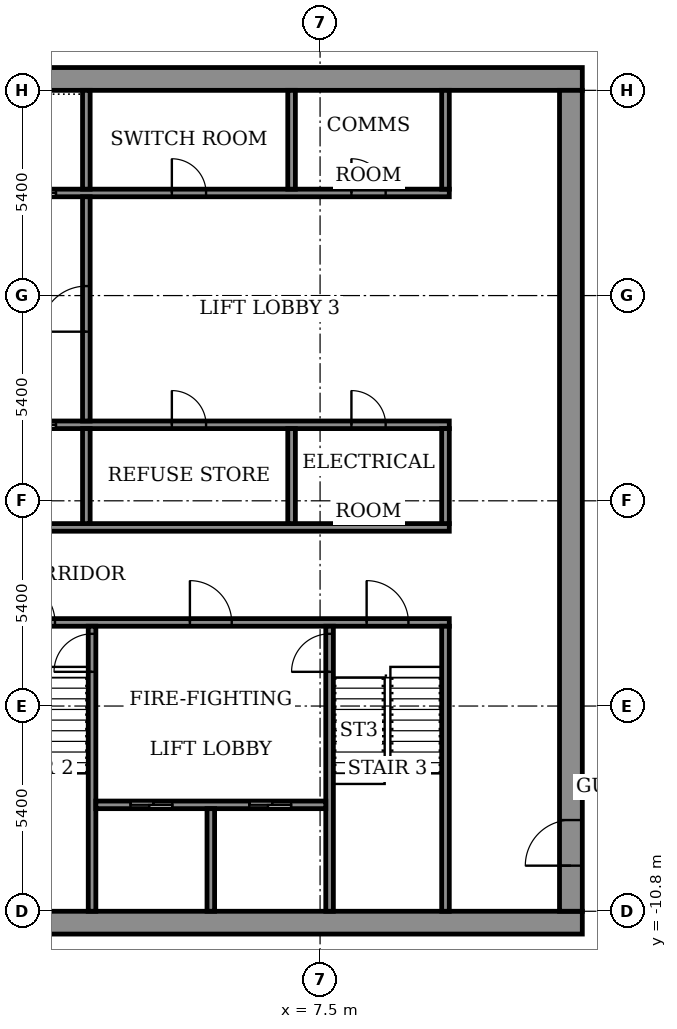
"""IFC4 building model, lengths in metres.
Left out: names, types, materials, properties, quantities, classifications, styles, units other than length and angle.
Written with IfcOpenShell. Run it as: python <this file> out.ifc"""

import sys

from ifc_helpers import new_model, si_unit, direction, frame, frame_2d, origin, place, context, subcontext, project, spatial, rectangle, extrude, element, fill, save


model = new_model("IFC4")
c1 = context("Model", 3, precision=1e-05, world=origin(), true_north=direction((0.0, 1.0)))
c2 = subcontext(c1, "Body", "Model", "MODEL_VIEW")
j1 = project(units=[si_unit("LENGTHUNIT", "METRE"), si_unit("PLANEANGLEUNIT", "RADIAN")], contexts=[c1])
p1 = place(None, origin())
s1 = spatial("IfcSite", under=j1, at=p1, CompositionType="ELEMENT")
p2 = place(p1, origin())
s2 = spatial("IfcBuilding", under=s1, at=p2, CompositionType="ELEMENT")
p3 = place(p2, frame((0.0, 0.0, 306.1)))
s3 = spatial("IfcBuildingStorey", under=s2, at=p3, CompositionType="ELEMENT", Elevation=306.1)
for number, where, z_axis, x_axis in (
    (1, (-14.4, -11.1, 0.0), (0.0, 0.0, 1.0), (1.0, 0.0, 0.0)),
    (2, (-14.4, 11.1, 0.0), (0.0, 0.0, 1.0), (1.0, 0.0, 0.0)),
):
    element("IfcWall", number, at=place(p3, frame(where, z_axis=z_axis, x_axis=x_axis)), inside=s3, PredefinedType="SHEAR", context=c2, shape_type="SweptSolid", body=[
        extrude(rectangle(XDim=28.8, YDim=0.6, at=frame_2d((14.4, 0.0))), origin(), (0.0, 0.0, 1.0), 3.6),
    ])
p4 = place(p3, frame((14.1, -10.8, 0.0), z_axis=(0.0, 0.0, 1.0), x_axis=(0.0, 1.0, 0.0)))
e3 = element("IfcWall", 3, at=p4, inside=s3, PredefinedType="SHEAR", context=c2, shape_type="SweptSolid", body=[
    extrude(rectangle(XDim=21.6, YDim=0.6, at=frame_2d((10.8, 0.0))), origin(), (0.0, 0.0, 1.0), 3.6),
])
p5 = place(p4, frame((1.2, 0.0, 0.0)))
e4 = element("IfcOpeningElement", 4, at=p5, cuts=e3, PredefinedType="OPENING", context=c2, shape_type="SweptSolid", body=[
    extrude(rectangle(XDim=1.2, YDim=2.1, at=frame_2d((0.6, 1.05))), frame((0.0, 0.31, 0.0), z_axis=(0.0, -1.0, 0.0), x_axis=(1.0, 0.0, 0.0)), (0.0, 0.0, 1.0), 0.62),
])
p6 = place(p3, frame((-10.9, -3.2, 0.0), z_axis=(0.0, 0.0, 1.0), x_axis=(1.0, 0.0, 0.0)))
e5 = element("IfcWall", 5, at=p6, inside=s3, PredefinedType="SHEAR", context=c2, shape_type="SweptSolid", body=[
    extrude(rectangle(XDim=21.8, YDim=0.2, at=frame_2d((10.9, 0.0))), origin(), (0.0, 0.0, 1.0), 3.05),
])
p7 = place(p6, frame((1.075, 0.0, 0.0)))
e6 = element("IfcOpeningElement", 6, at=p7, cuts=e5, PredefinedType="OPENING", context=c2, shape_type="SweptSolid", body=[
    extrude(rectangle(XDim=1.1, YDim=2.1, at=frame_2d((0.55, 1.05))), frame((0.0, 0.11, 0.0), z_axis=(0.0, -1.0, 0.0), x_axis=(1.0, 0.0, 0.0)), (0.0, 0.0, 1.0), 0.22),
])
p8 = place(p6, frame((10.325, 0.0, 0.0)))
e7 = element("IfcOpeningElement", 7, at=p8, cuts=e5, PredefinedType="OPENING", context=c2, shape_type="SweptSolid", body=[
    extrude(rectangle(XDim=1.1, YDim=2.1, at=frame_2d((0.55, 1.05))), frame((0.0, 0.11, 0.0), z_axis=(0.0, -1.0, 0.0), x_axis=(1.0, 0.0, 0.0)), (0.0, 0.0, 1.0), 0.22),
])
p9 = place(p6, frame((19.625, 0.0, 0.0)))
e8 = element("IfcOpeningElement", 8, at=p9, cuts=e5, PredefinedType="OPENING", context=c2, shape_type="SweptSolid", body=[
    extrude(rectangle(XDim=1.1, YDim=2.1, at=frame_2d((0.55, 1.05))), frame((0.0, 0.11, 0.0), z_axis=(0.0, -1.0, 0.0), x_axis=(1.0, 0.0, 0.0)), (0.0, 0.0, 1.0), 0.22),
])
p10 = place(p6, frame((5.7, 0.0, 0.0)))
e9 = element("IfcOpeningElement", 9, at=p10, cuts=e5, PredefinedType="OPENING", context=c2, shape_type="SweptSolid", body=[
    extrude(rectangle(XDim=1.1, YDim=2.1, at=frame_2d((0.55, 1.05))), frame((0.0, 0.11, 0.0), z_axis=(0.0, -1.0, 0.0), x_axis=(1.0, 0.0, 0.0)), (0.0, 0.0, 1.0), 0.22),
])
p11 = place(p6, frame((14.975, 0.0, 0.0)))
e10 = element("IfcOpeningElement", 10, at=p11, cuts=e5, PredefinedType="OPENING", context=c2, shape_type="SweptSolid", body=[
    extrude(rectangle(XDim=1.1, YDim=2.1, at=frame_2d((0.55, 1.05))), frame((0.0, 0.11, 0.0), z_axis=(0.0, -1.0, 0.0), x_axis=(1.0, 0.0, 0.0)), (0.0, 0.0, 1.0), 0.22),
])
p12 = place(p3, frame((-10.9, -0.7, 0.0), z_axis=(0.0, 0.0, 1.0), x_axis=(1.0, 0.0, 0.0)))
e11 = element("IfcWall", 11, at=p12, inside=s3, PredefinedType="SHEAR", context=c2, shape_type="SweptSolid", body=[
    extrude(rectangle(XDim=21.8, YDim=0.2, at=frame_2d((10.9, 0.0))), origin(), (0.0, 0.0, 1.0), 3.05),
])
p13 = place(p3, frame((-10.9, 2.0, 0.0), z_axis=(0.0, 0.0, 1.0), x_axis=(1.0, 0.0, 0.0)))
e12 = element("IfcWall", 12, at=p13, inside=s3, PredefinedType="SHEAR", context=c2, shape_type="SweptSolid", body=[
    extrude(rectangle(XDim=21.8, YDim=0.2, at=frame_2d((10.9, 0.0))), origin(), (0.0, 0.0, 1.0), 3.05),
])
p14 = place(p13, frame((4.95, 0.0, 0.0)))
e13 = element("IfcOpeningElement", 13, at=p14, cuts=e12, PredefinedType="OPENING", context=c2, shape_type="SweptSolid", body=[
    extrude(rectangle(XDim=1.1, YDim=2.1, at=frame_2d((0.55, 1.05))), frame((0.0, 0.11, 0.0), z_axis=(0.0, -1.0, 0.0), x_axis=(1.0, 0.0, 0.0)), (0.0, 0.0, 1.0), 0.22),
])
p15 = place(p13, frame((7.65, 0.0, 0.0)))
e14 = element("IfcOpeningElement", 14, at=p15, cuts=e12, PredefinedType="OPENING", context=c2, shape_type="SweptSolid", body=[
    extrude(rectangle(XDim=1.1, YDim=2.1, at=frame_2d((0.55, 1.05))), frame((0.0, 0.11, 0.0), z_axis=(0.0, -1.0, 0.0), x_axis=(1.0, 0.0, 0.0)), (0.0, 0.0, 1.0), 0.22),
])
p16 = place(p13, frame((10.35, 0.0, 0.0)))
e15 = element("IfcOpeningElement", 15, at=p16, cuts=e12, PredefinedType="OPENING", context=c2, shape_type="SweptSolid", body=[
    extrude(rectangle(XDim=1.1, YDim=2.1, at=frame_2d((0.55, 1.05))), frame((0.0, 0.11, 0.0), z_axis=(0.0, -1.0, 0.0), x_axis=(1.0, 0.0, 0.0)), (0.0, 0.0, 1.0), 0.22),
])
p17 = place(p13, frame((1.675, 0.0, 0.0)))
e16 = element("IfcOpeningElement", 16, at=p17, cuts=e12, PredefinedType="OPENING", context=c2, shape_type="SweptSolid", body=[
    extrude(rectangle(XDim=0.9, YDim=2.1, at=frame_2d((0.45, 1.05))), frame((0.0, 0.11, 0.0), z_axis=(0.0, -1.0, 0.0), x_axis=(1.0, 0.0, 0.0)), (0.0, 0.0, 1.0), 0.22),
])
p18 = place(p13, frame((14.5, 0.0, 0.0)))
e17 = element("IfcOpeningElement", 17, at=p18, cuts=e12, PredefinedType="OPENING", context=c2, shape_type="SweptSolid", body=[
    extrude(rectangle(XDim=0.9, YDim=2.1, at=frame_2d((0.45, 1.05))), frame((0.0, 0.11, 0.0), z_axis=(0.0, -1.0, 0.0), x_axis=(1.0, 0.0, 0.0)), (0.0, 0.0, 1.0), 0.22),
])
p19 = place(p13, frame((19.225, 0.0, 0.0)))
e18 = element("IfcOpeningElement", 18, at=p19, cuts=e12, PredefinedType="OPENING", context=c2, shape_type="SweptSolid", body=[
    extrude(rectangle(XDim=0.9, YDim=2.1, at=frame_2d((0.45, 1.05))), frame((0.0, 0.11, 0.0), z_axis=(0.0, -1.0, 0.0), x_axis=(1.0, 0.0, 0.0)), (0.0, 0.0, 1.0), 0.22),
])
p20 = place(p3, frame((-10.9, 8.1, 0.0), z_axis=(0.0, 0.0, 1.0), x_axis=(1.0, 0.0, 0.0)))
e19 = element("IfcWall", 19, at=p20, inside=s3, PredefinedType="SHEAR", context=c2, shape_type="SweptSolid", body=[
    extrude(rectangle(XDim=21.8, YDim=0.2, at=frame_2d((10.9, 0.0))), origin(), (0.0, 0.0, 1.0), 3.05),
])
p21 = place(p20, frame((4.95, 0.0, 0.0)))
e20 = element("IfcOpeningElement", 20, at=p21, cuts=e19, PredefinedType="OPENING", context=c2, shape_type="SweptSolid", body=[
    extrude(rectangle(XDim=1.1, YDim=2.1, at=frame_2d((0.55, 1.05))), frame((0.0, 0.11, 0.0), z_axis=(0.0, -1.0, 0.0), x_axis=(1.0, 0.0, 0.0)), (0.0, 0.0, 1.0), 0.22),
])
p22 = place(p20, frame((7.65, 0.0, 0.0)))
e21 = element("IfcOpeningElement", 21, at=p22, cuts=e19, PredefinedType="OPENING", context=c2, shape_type="SweptSolid", body=[
    extrude(rectangle(XDim=1.1, YDim=2.1, at=frame_2d((0.55, 1.05))), frame((0.0, 0.11, 0.0), z_axis=(0.0, -1.0, 0.0), x_axis=(1.0, 0.0, 0.0)), (0.0, 0.0, 1.0), 0.22),
])
p23 = place(p20, frame((10.35, 0.0, 0.0)))
e22 = element("IfcOpeningElement", 22, at=p23, cuts=e19, PredefinedType="OPENING", context=c2, shape_type="SweptSolid", body=[
    extrude(rectangle(XDim=1.1, YDim=2.1, at=frame_2d((0.55, 1.05))), frame((0.0, 0.11, 0.0), z_axis=(0.0, -1.0, 0.0), x_axis=(1.0, 0.0, 0.0)), (0.0, 0.0, 1.0), 0.22),
])
p24 = place(p20, frame((1.675, 0.0, 0.0)))
e23 = element("IfcOpeningElement", 23, at=p24, cuts=e19, PredefinedType="OPENING", context=c2, shape_type="SweptSolid", body=[
    extrude(rectangle(XDim=0.9, YDim=2.1, at=frame_2d((0.45, 1.05))), frame((0.0, 0.11, 0.0), z_axis=(0.0, -1.0, 0.0), x_axis=(1.0, 0.0, 0.0)), (0.0, 0.0, 1.0), 0.22),
])
p25 = place(p20, frame((14.5, 0.0, 0.0)))
e24 = element("IfcOpeningElement", 24, at=p25, cuts=e19, PredefinedType="OPENING", context=c2, shape_type="SweptSolid", body=[
    extrude(rectangle(XDim=0.9, YDim=2.1, at=frame_2d((0.45, 1.05))), frame((0.0, 0.11, 0.0), z_axis=(0.0, -1.0, 0.0), x_axis=(1.0, 0.0, 0.0)), (0.0, 0.0, 1.0), 0.22),
])
p26 = place(p20, frame((19.225, 0.0, 0.0)))
e25 = element("IfcOpeningElement", 25, at=p26, cuts=e19, PredefinedType="OPENING", context=c2, shape_type="SweptSolid", body=[
    extrude(rectangle(XDim=0.9, YDim=2.1, at=frame_2d((0.45, 1.05))), frame((0.0, 0.11, 0.0), z_axis=(0.0, -1.0, 0.0), x_axis=(1.0, 0.0, 0.0)), (0.0, 0.0, 1.0), 0.22),
])
p27 = place(p3, frame((1.5, -10.8, 0.0), z_axis=(0.0, 0.0, 1.0), x_axis=(0.0, 1.0, 0.0)))
e26 = element("IfcWall", 26, at=p27, inside=s3, PredefinedType="SHEAR", context=c2, shape_type="SweptSolid", body=[
    extrude(rectangle(XDim=7.5, YDim=0.2, at=frame_2d((3.75, 0.0))), origin(), (0.0, 0.0, 1.0), 3.05),
])
p28 = place(p27, frame((6.3, 0.0, 0.0)))
e27 = element("IfcOpeningElement", 27, at=p28, cuts=e26, PredefinedType="OPENING", context=c2, shape_type="SweptSolid", body=[
    extrude(rectangle(XDim=1.0, YDim=2.1, at=frame_2d((0.5, 1.05))), frame((0.0, 0.11, 0.0), z_axis=(0.0, -1.0, 0.0), x_axis=(1.0, 0.0, 0.0)), (0.0, 0.0, 1.0), 0.22),
])
p29 = place(p3, frame((7.75, -10.8, 0.0), z_axis=(0.0, 0.0, 1.0), x_axis=(0.0, 1.0, 0.0)))
e28 = element("IfcWall", 28, at=p29, inside=s3, PredefinedType="SHEAR", context=c2, shape_type="SweptSolid", body=[
    extrude(rectangle(XDim=7.5, YDim=0.2, at=frame_2d((3.75, 0.0))), origin(), (0.0, 0.0, 1.0), 3.05),
])
p30 = place(p29, frame((6.3, 0.0, 0.0)))
e29 = element("IfcOpeningElement", 29, at=p30, cuts=e28, PredefinedType="OPENING", context=c2, shape_type="SweptSolid", body=[
    extrude(rectangle(XDim=1.0, YDim=2.1, at=frame_2d((0.5, 1.05))), frame((0.0, 0.11, 0.0), z_axis=(0.0, -1.0, 0.0), x_axis=(1.0, 0.0, 0.0)), (0.0, 0.0, 1.0), 0.22),
])
p31 = place(p3, frame((10.8, -10.8, 0.0), z_axis=(0.0, 0.0, 1.0), x_axis=(0.0, 1.0, 0.0)))
e30 = element("IfcWall", 30, at=p31, inside=s3, PredefinedType="SHEAR", context=c2, shape_type="SweptSolid", body=[
    extrude(rectangle(XDim=7.5, YDim=0.2, at=frame_2d((3.75, 0.0))), origin(), (0.0, 0.0, 1.0), 3.05),
])
p32 = place(p3, frame((1.6, -8.0, 0.0), z_axis=(0.0, 0.0, 1.0), x_axis=(1.0, 0.0, 0.0)))
e31 = element("IfcWall", 31, at=p32, inside=s3, PredefinedType="SHEAR", context=c2, shape_type="SweptSolid", body=[
    extrude(rectangle(XDim=6.05, YDim=0.2, at=frame_2d((3.025, 0.0))), origin(), (0.0, 0.0, 1.0), 3.05),
])
p33 = place(p32, frame((0.913, 0.0, 0.0)))
e32 = element("IfcOpeningElement", 32, at=p33, cuts=e31, PredefinedType="OPENING", context=c2, shape_type="SweptSolid", body=[
    extrude(rectangle(XDim=1.1, YDim=2.1, at=frame_2d((0.55, 1.05))), frame((0.0, 0.11, 0.0), z_axis=(0.0, -1.0, 0.0), x_axis=(1.0, 0.0, 0.0)), (0.0, 0.0, 1.0), 0.22),
])
p34 = place(p32, frame((4.038, 0.0, 0.0)))
e33 = element("IfcOpeningElement", 33, at=p34, cuts=e31, PredefinedType="OPENING", context=c2, shape_type="SweptSolid", body=[
    extrude(rectangle(XDim=1.1, YDim=2.1, at=frame_2d((0.55, 1.05))), frame((0.0, 0.11, 0.0), z_axis=(0.0, -1.0, 0.0), x_axis=(1.0, 0.0, 0.0)), (0.0, 0.0, 1.0), 0.22),
])
p35 = place(p3, frame((4.625, -10.8, 0.0), z_axis=(0.0, 0.0, 1.0), x_axis=(0.0, 1.0, 0.0)))
e34 = element("IfcWall", 34, at=p35, inside=s3, PredefinedType="SHEAR", context=c2, shape_type="SweptSolid", body=[
    extrude(rectangle(XDim=2.7, YDim=0.2, at=frame_2d((1.35, 0.0))), origin(), (0.0, 0.0, 1.0), 3.05),
])
p36 = place(p3, frame((1.35, -0.6, 0.0), z_axis=(0.0, 0.0, 1.0), x_axis=(0.0, 1.0, 0.0)))
e35 = element("IfcWall", 35, at=p36, inside=s3, PredefinedType="SHEAR", context=c2, shape_type="SweptSolid", body=[
    extrude(rectangle(XDim=2.5, YDim=0.2, at=frame_2d((1.25, 0.0))), origin(), (0.0, 0.0, 1.0), 3.05),
])
for number, where, z_axis, x_axis in (
    (36, (6.75, -0.6, 0.0), (0.0, 0.0, 1.0), (0.0, 1.0, 0.0)),
    (37, (10.8, -0.6, 0.0), (0.0, 0.0, 1.0), (0.0, 1.0, 0.0)),
):
    element("IfcWall", number, at=place(p3, frame(where, z_axis=z_axis, x_axis=x_axis)), inside=s3, PredefinedType="STANDARD", context=c2, shape_type="SweptSolid", body=[
        extrude(rectangle(XDim=2.5, YDim=0.2, at=frame_2d((1.25, 0.0))), origin(), (0.0, 0.0, 1.0), 3.05),
    ])
p37 = place(p3, frame((1.35, 8.2, 0.0), z_axis=(0.0, 0.0, 1.0), x_axis=(0.0, 1.0, 0.0)))
e38 = element("IfcWall", 38, at=p37, inside=s3, PredefinedType="SHEAR", context=c2, shape_type="SweptSolid", body=[
    extrude(rectangle(XDim=2.6, YDim=0.2, at=frame_2d((1.3, 0.0))), origin(), (0.0, 0.0, 1.0), 3.05),
])
for number, where, z_axis, x_axis in (
    (39, (6.75, 8.2, 0.0), (0.0, 0.0, 1.0), (0.0, 1.0, 0.0)),
    (40, (10.8, 8.2, 0.0), (0.0, 0.0, 1.0), (0.0, 1.0, 0.0)),
):
    element("IfcWall", number, at=place(p3, frame(where, z_axis=z_axis, x_axis=x_axis)), inside=s3, PredefinedType="STANDARD", context=c2, shape_type="SweptSolid", body=[
        extrude(rectangle(XDim=2.6, YDim=0.2, at=frame_2d((1.3, 0.0))), origin(), (0.0, 0.0, 1.0), 3.05),
    ])
p38 = place(p3, frame((1.35, 2.1, 0.0), z_axis=(0.0, 0.0, 1.0), x_axis=(0.0, 1.0, 0.0)))
e41 = element("IfcWall", 41, at=p38, inside=s3, PredefinedType="STANDARD", context=c2, shape_type="SweptSolid", body=[
    extrude(rectangle(XDim=5.9, YDim=0.2, at=frame_2d((2.95, 0.0))), origin(), (0.0, 0.0, 1.0), 3.05),
])
p39 = place(p38, frame((2.35, 0.0, 0.0)))
e42 = element("IfcOpeningElement", 42, at=p39, cuts=e41, PredefinedType="OPENING", context=c2, shape_type="SweptSolid", body=[
    extrude(rectangle(XDim=1.2, YDim=2.1, at=frame_2d((0.6, 1.05))), frame((0.0, 0.11, 0.0), z_axis=(0.0, -1.0, 0.0), x_axis=(1.0, 0.0, 0.0)), (0.0, 0.0, 1.0), 0.22),
])
p40 = place(p5, origin())
e43 = element("IfcDoor", 43, at=p40, inside=s3, OperationType="DOUBLE_DOOR_SINGLE_SWING", PredefinedType="DOOR", context=c2, shape_type="SweptSolid", body=[
    extrude(rectangle(XDim=1.2, YDim=2.1, at=frame_2d((0.6, 1.05))), frame((0.0, 0.025, 0.0), z_axis=(0.0, -1.0, 0.0), x_axis=(1.0, 0.0, 0.0)), (0.0, 0.0, 1.0), 0.05),
])
fill(e4, e43)
p41 = place(p16, origin())
e44 = element("IfcDoor", 44, at=p41, inside=s3, OperationType="SLIDING_TO_LEFT", PredefinedType="DOOR", context=c2, shape_type="SweptSolid", body=[
    extrude(rectangle(XDim=1.1, YDim=2.1, at=frame_2d((0.55, 1.05))), frame((0.0, 0.025, 0.0), z_axis=(0.0, -1.0, 0.0), x_axis=(1.0, 0.0, 0.0)), (0.0, 0.0, 1.0), 0.05),
])
fill(e15, e44)
p42 = place(p23, origin())
e45 = element("IfcDoor", 45, at=p42, inside=s3, OperationType="SLIDING_TO_LEFT", PredefinedType="DOOR", context=c2, shape_type="SweptSolid", body=[
    extrude(rectangle(XDim=1.1, YDim=2.1, at=frame_2d((0.55, 1.05))), frame((0.0, 0.025, 0.0), z_axis=(0.0, -1.0, 0.0), x_axis=(1.0, 0.0, 0.0)), (0.0, 0.0, 1.0), 0.05),
])
fill(e22, e45)
p43 = place(p18, origin())
e46 = element("IfcDoor", 46, at=p43, inside=s3, OperationType="SINGLE_SWING_RIGHT", PredefinedType="DOOR", context=c2, shape_type="SweptSolid", body=[
    extrude(rectangle(XDim=0.9, YDim=2.1, at=frame_2d((0.45, 1.05))), frame((0.0, 0.025, 0.0), z_axis=(0.0, -1.0, 0.0), x_axis=(1.0, 0.0, 0.0)), (0.0, 0.0, 1.0), 0.05),
])
fill(e17, e46)
p44 = place(p19, origin())
e47 = element("IfcDoor", 47, at=p44, inside=s3, OperationType="SINGLE_SWING_LEFT", PredefinedType="DOOR", context=c2, shape_type="SweptSolid", body=[
    extrude(rectangle(XDim=0.9, YDim=2.1, at=frame_2d((0.45, 1.05))), frame((0.0, 0.025, 0.0), z_axis=(0.0, -1.0, 0.0), x_axis=(1.0, 0.0, 0.0)), (0.0, 0.0, 1.0), 0.05),
])
fill(e18, e47)
p45 = place(p25, origin())
e48 = element("IfcDoor", 48, at=p45, inside=s3, OperationType="SINGLE_SWING_LEFT", PredefinedType="DOOR", context=c2, shape_type="SweptSolid", body=[
    extrude(rectangle(XDim=0.9, YDim=2.1, at=frame_2d((0.45, 1.05))), frame((0.0, 0.025, 0.0), z_axis=(0.0, -1.0, 0.0), x_axis=(1.0, 0.0, 0.0)), (0.0, 0.0, 1.0), 0.05),
])
fill(e24, e48)
p46 = place(p26, origin())
e49 = element("IfcDoor", 49, at=p46, inside=s3, OperationType="SINGLE_SWING_LEFT", PredefinedType="DOOR", context=c2, shape_type="SweptSolid", body=[
    extrude(rectangle(XDim=0.9, YDim=2.1, at=frame_2d((0.45, 1.05))), frame((0.0, 0.025, 0.0), z_axis=(0.0, -1.0, 0.0), x_axis=(1.0, 0.0, 0.0)), (0.0, 0.0, 1.0), 0.05),
])
fill(e25, e49)
p47 = place(p33, origin())
e50 = element("IfcDoor", 50, at=p47, inside=s3, OperationType="SLIDING_TO_LEFT", PredefinedType="DOOR", context=c2, shape_type="SweptSolid", body=[
    extrude(rectangle(XDim=1.1, YDim=2.1, at=frame_2d((0.55, 1.05))), frame((0.0, 0.025, 0.0), z_axis=(0.0, -1.0, 0.0), x_axis=(1.0, 0.0, 0.0)), (0.0, 0.0, 1.0), 0.05),
])
fill(e32, e50)
p48 = place(p34, origin())
e51 = element("IfcDoor", 51, at=p48, inside=s3, OperationType="SLIDING_TO_LEFT", PredefinedType="DOOR", context=c2, shape_type="SweptSolid", body=[
    extrude(rectangle(XDim=1.1, YDim=2.1, at=frame_2d((0.55, 1.05))), frame((0.0, 0.025, 0.0), z_axis=(0.0, -1.0, 0.0), x_axis=(1.0, 0.0, 0.0)), (0.0, 0.0, 1.0), 0.05),
])
fill(e33, e51)
p49 = place(p8, origin())
e52 = element("IfcDoor", 52, at=p49, inside=s3, OperationType="SINGLE_SWING_RIGHT", PredefinedType="DOOR", context=c2, shape_type="SweptSolid", body=[
    extrude(rectangle(XDim=1.1, YDim=2.1, at=frame_2d((0.55, 1.05))), frame((0.0, 0.025, 0.0), z_axis=(0.0, -1.0, 0.0), x_axis=(1.0, 0.0, 0.0)), (0.0, 0.0, 1.0), 0.05),
])
fill(e7, e52)
p50 = place(p9, origin())
e53 = element("IfcDoor", 53, at=p50, inside=s3, OperationType="SINGLE_SWING_RIGHT", PredefinedType="DOOR", context=c2, shape_type="SweptSolid", body=[
    extrude(rectangle(XDim=1.1, YDim=2.1, at=frame_2d((0.55, 1.05))), frame((0.0, 0.025, 0.0), z_axis=(0.0, -1.0, 0.0), x_axis=(1.0, 0.0, 0.0)), (0.0, 0.0, 1.0), 0.05),
])
fill(e8, e53)
p51 = place(p11, origin())
e54 = element("IfcDoor", 54, at=p51, inside=s3, OperationType="SINGLE_SWING_LEFT", PredefinedType="DOOR", context=c2, shape_type="SweptSolid", body=[
    extrude(rectangle(XDim=1.1, YDim=2.1, at=frame_2d((0.55, 1.05))), frame((0.0, 0.025, 0.0), z_axis=(0.0, -1.0, 0.0), x_axis=(1.0, 0.0, 0.0)), (0.0, 0.0, 1.0), 0.05),
])
fill(e10, e54)
p52 = place(p28, origin())
e55 = element("IfcDoor", 55, at=p52, inside=s3, OperationType="SINGLE_SWING_RIGHT", PredefinedType="DOOR", context=c2, shape_type="SweptSolid", body=[
    extrude(rectangle(XDim=1.0, YDim=2.1, at=frame_2d((0.5, 1.05))), frame((0.0, 0.025, 0.0), z_axis=(0.0, -1.0, 0.0), x_axis=(1.0, 0.0, 0.0)), (0.0, 0.0, 1.0), 0.05),
])
fill(e27, e55)
p53 = place(p30, origin())
e56 = element("IfcDoor", 56, at=p53, inside=s3, OperationType="SINGLE_SWING_RIGHT", PredefinedType="DOOR", context=c2, shape_type="SweptSolid", body=[
    extrude(rectangle(XDim=1.0, YDim=2.1, at=frame_2d((0.5, 1.05))), frame((0.0, 0.025, 0.0), z_axis=(0.0, -1.0, 0.0), x_axis=(1.0, 0.0, 0.0)), (0.0, 0.0, 1.0), 0.05),
])
fill(e29, e56)
p54 = place(p39, origin())
e57 = element("IfcDoor", 57, at=p54, inside=s3, OperationType="SINGLE_SWING_LEFT", PredefinedType="DOOR", context=c2, shape_type="SweptSolid", body=[
    extrude(rectangle(XDim=1.2, YDim=2.1, at=frame_2d((0.6, 1.05))), frame((0.0, 0.025, 0.0), z_axis=(0.0, -1.0, 0.0), x_axis=(1.0, 0.0, 0.0)), (0.0, 0.0, 1.0), 0.05),
])
fill(e42, e57)
save(model, sys.argv[1])
